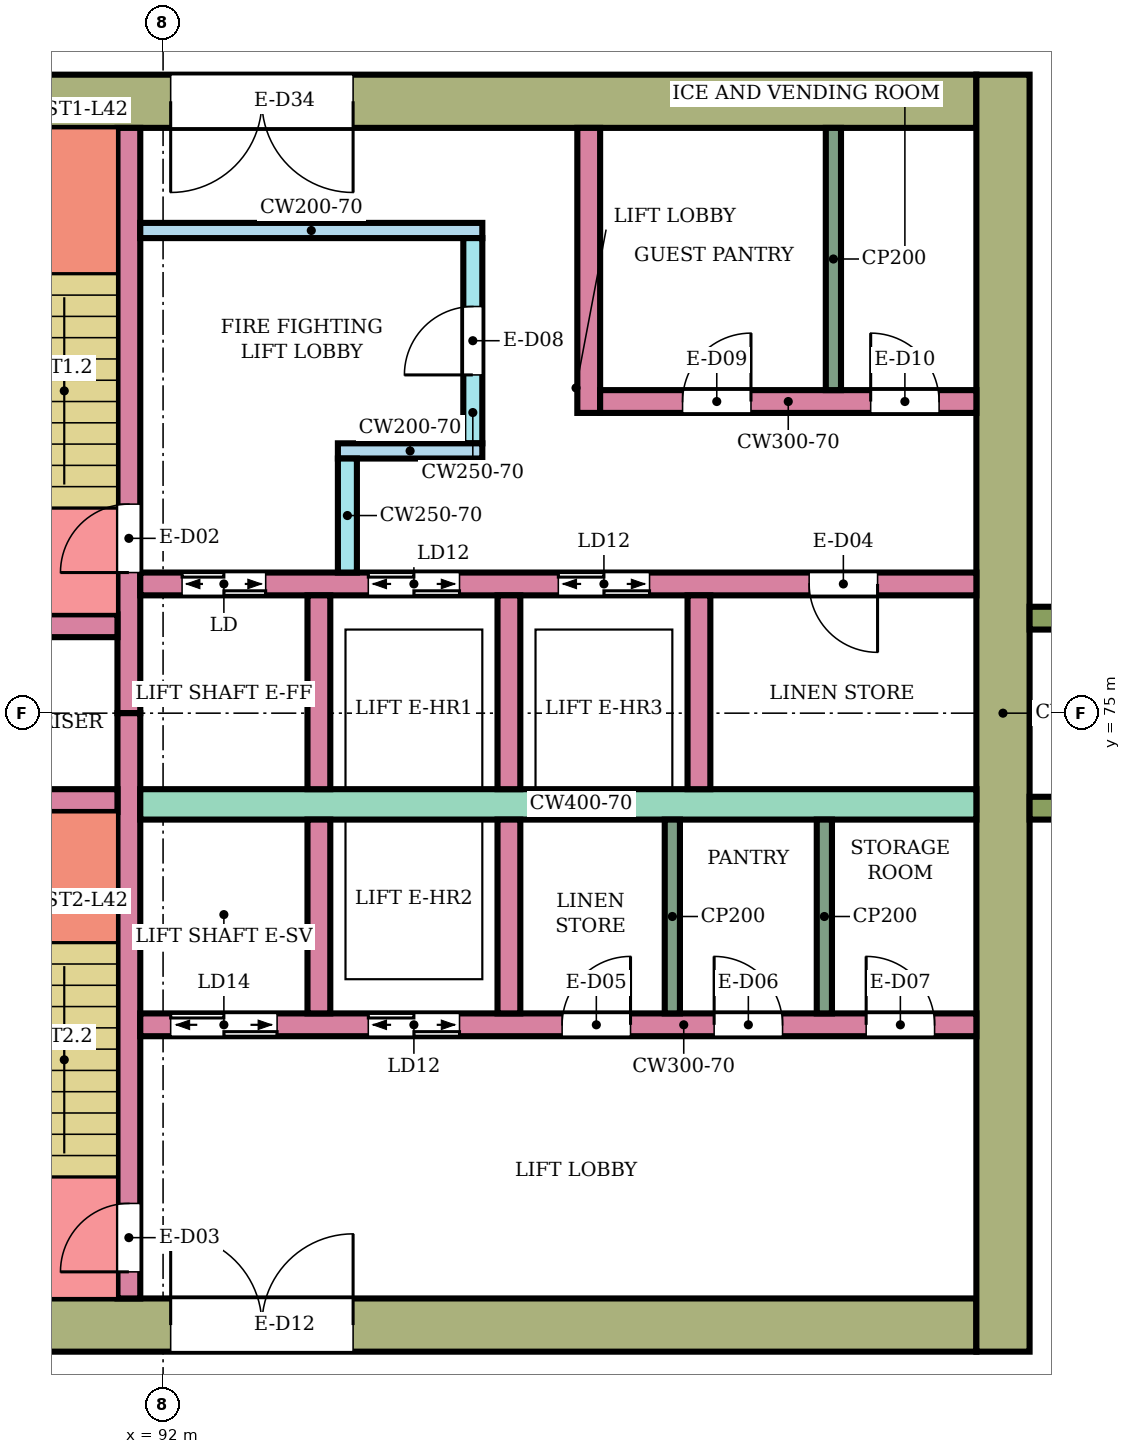
"""IFC4 building model, lengths in metres.
Left out: names, types, materials, properties, quantities, classifications, styles, units other than length and angle.
Written with IfcOpenShell. Run it as: python <this file> out.ifc"""

import sys

from ifc_helpers import new_model, si_unit, direction, frame, frame_2d, origin, place, context, subcontext, project, spatial, rectangle, extrude, element, fill, save


model = new_model("IFC4")
c1 = context("Model", 3, precision=1e-05, world=origin(), true_north=direction((0.0, 1.0)))
c2 = subcontext(c1, "Body", "Model", "MODEL_VIEW")
j1 = project(units=[si_unit("LENGTHUNIT", "METRE"), si_unit("PLANEANGLEUNIT", "RADIAN")], contexts=[c1])
p1 = place(None, origin())
s1 = spatial("IfcSite", under=j1, at=p1, CompositionType="ELEMENT")
p2 = place(p1, origin())
s2 = spatial("IfcBuilding", under=s1, at=p2, CompositionType="ELEMENT")
p3 = place(p2, frame((0.0, 0.0, 182.3)))
s3 = spatial("IfcBuildingStorey", under=s2, at=p3, CompositionType="ELEMENT", Elevation=182.3)
p4 = place(p3, frame((87.9, 83.05, 0.0), z_axis=(0.0, 0.0, 1.0), x_axis=(1.0, 0.0, 0.0)))
e1 = element("IfcWall", 1, at=p4, inside=s3, PredefinedType="SHEAR", context=c2, shape_type="SweptSolid", body=[
    extrude(rectangle(XDim=14.8, YDim=0.7, at=frame_2d((7.4, 0.0))), origin(), (0.0, 0.0, 1.0), 3.78),
])
p5 = place(p4, frame((4.2, 0.0, 0.0)))
e2 = element("IfcOpeningElement", 2, at=p5, cuts=e1, PredefinedType="OPENING", context=c2, shape_type="SweptSolid", body=[
    extrude(rectangle(XDim=2.4, YDim=2.4, at=frame_2d((1.2, 1.2))), frame((0.0, 0.36, 0.0), z_axis=(0.0, -1.0, 0.0), x_axis=(1.0, 0.0, 0.0)), (0.0, 0.0, 1.0), 0.72),
])
p6 = place(p3, frame((87.9, 66.95, 0.0), z_axis=(0.0, 0.0, 1.0), x_axis=(1.0, 0.0, 0.0)))
e3 = element("IfcWall", 3, at=p6, inside=s3, PredefinedType="SHEAR", context=c2, shape_type="SweptSolid", body=[
    extrude(rectangle(XDim=14.8, YDim=0.7, at=frame_2d((7.4, 0.0))), origin(), (0.0, 0.0, 1.0), 3.78),
])
p7 = place(p6, frame((4.2, 0.0, 0.0)))
e4 = element("IfcOpeningElement", 4, at=p7, cuts=e3, PredefinedType="OPENING", context=c2, shape_type="SweptSolid", body=[
    extrude(rectangle(XDim=2.4, YDim=2.4, at=frame_2d((1.2, 1.2))), frame((0.0, 0.36, 0.0), z_axis=(0.0, -1.0, 0.0), x_axis=(1.0, 0.0, 0.0)), (0.0, 0.0, 1.0), 0.72),
])
p8 = place(p3, frame((103.05, 66.6, 0.0), z_axis=(0.0, 0.0, 1.0), x_axis=(0.0, 1.0, 0.0)))
e5 = element("IfcWall", 5, at=p8, inside=s3, PredefinedType="SHEAR", context=c2, shape_type="SweptSolid", body=[
    extrude(rectangle(XDim=16.8, YDim=0.7, at=frame_2d((8.4, 0.0))), origin(), (0.0, 0.0, 1.0), 3.78),
])
p9 = place(p3, frame((91.55, 75.0, 0.0), z_axis=(0.0, 0.0, 1.0), x_axis=(0.0, 1.0, 0.0)))
e6 = element("IfcWall", 6, at=p9, inside=s3, PredefinedType="SHEAR", context=c2, shape_type="SweptSolid", body=[
    extrude(rectangle(XDim=7.7, YDim=0.3, at=frame_2d((3.85, 0.0))), origin(), (0.0, 0.0, 1.0), 3.78),
])
p10 = place(p9, frame((1.85, 0.0, 0.0)))
e7 = element("IfcOpeningElement", 7, at=p10, cuts=e6, PredefinedType="OPENING", context=c2, shape_type="SweptSolid", body=[
    extrude(rectangle(XDim=0.9, YDim=2.1, at=frame_2d((0.45, 1.05))), frame((0.0, 0.16, 0.0), z_axis=(0.0, -1.0, 0.0), x_axis=(1.0, 0.0, 0.0)), (0.0, 0.0, 1.0), 0.32),
])
p11 = place(p3, frame((91.55, 67.3, 0.0), z_axis=(0.0, 0.0, 1.0), x_axis=(0.0, 1.0, 0.0)))
e8 = element("IfcWall", 8, at=p11, inside=s3, PredefinedType="SHEAR", context=c2, shape_type="SweptSolid", body=[
    extrude(rectangle(XDim=7.7, YDim=0.3, at=frame_2d((3.85, 0.0))), origin(), (0.0, 0.0, 1.0), 3.78),
])
p12 = place(p11, frame((0.35, 0.0, 0.0)))
e9 = element("IfcOpeningElement", 9, at=p12, cuts=e8, PredefinedType="OPENING", context=c2, shape_type="SweptSolid", body=[
    extrude(rectangle(XDim=0.9, YDim=2.1, at=frame_2d((0.45, 1.05))), frame((0.0, 0.16, 0.0), z_axis=(0.0, -1.0, 0.0), x_axis=(1.0, 0.0, 0.0)), (0.0, 0.0, 1.0), 0.32),
])
p13 = place(p3, frame((88.35, 76.15, 0.0), z_axis=(0.0, 0.0, 1.0), x_axis=(1.0, 0.0, 0.0)))
e10 = element("IfcWall", 10, at=p13, inside=s3, PredefinedType="SHEAR", context=c2, shape_type="SweptSolid", body=[
    extrude(rectangle(XDim=3.05, YDim=0.3, at=frame_2d((1.525, 0.0))), origin(), (0.0, 0.0, 1.0), 3.78),
])
p14 = place(p13, frame((1.1, 0.0, 0.0)))
e11 = element("IfcOpeningElement", 11, at=p14, cuts=e10, PredefinedType="OPENING", context=c2, shape_type="SweptSolid", body=[
    extrude(rectangle(XDim=0.7, YDim=2.0, at=frame_2d((0.35, 1.0))), frame((0.0, 0.16, 0.0), z_axis=(0.0, -1.0, 0.0), x_axis=(1.0, 0.0, 0.0)), (0.0, 0.0, 1.0), 0.32),
])
p15 = place(p3, frame((88.35, 73.85, 0.0), z_axis=(0.0, 0.0, 1.0), x_axis=(1.0, 0.0, 0.0)))
e12 = element("IfcWall", 12, at=p15, inside=s3, PredefinedType="SHEAR", context=c2, shape_type="SweptSolid", body=[
    extrude(rectangle(XDim=3.05, YDim=0.3, at=frame_2d((1.525, 0.0))), origin(), (0.0, 0.0, 1.0), 3.78),
])
p16 = place(p3, frame((91.7, 76.7, 0.0), z_axis=(0.0, 0.0, 1.0), x_axis=(1.0, 0.0, 0.0)))
e13 = element("IfcWall", 13, at=p16, inside=s3, PredefinedType="SHEAR", context=c2, shape_type="SweptSolid", body=[
    extrude(rectangle(XDim=11.0, YDim=0.3, at=frame_2d((5.5, 0.0))), origin(), (0.0, 0.0, 1.0), 3.78),
])
p17 = place(p16, frame((0.55, 0.0, 0.0)))
e14 = element("IfcOpeningElement", 14, at=p17, cuts=e13, PredefinedType="OPENING", context=c2, shape_type="SweptSolid", body=[
    extrude(rectangle(XDim=1.1, YDim=2.1, at=frame_2d((0.55, 1.05))), frame((0.0, 0.16, 0.0), z_axis=(0.0, -1.0, 0.0), x_axis=(1.0, 0.0, 0.0)), (0.0, 0.0, 1.0), 0.32),
])
p18 = place(p16, frame((3.0, 0.0, 0.0)))
e15 = element("IfcOpeningElement", 15, at=p18, cuts=e13, PredefinedType="OPENING", context=c2, shape_type="SweptSolid", body=[
    extrude(rectangle(XDim=1.2, YDim=2.1, at=frame_2d((0.6, 1.05))), frame((0.0, 0.16, 0.0), z_axis=(0.0, -1.0, 0.0), x_axis=(1.0, 0.0, 0.0)), (0.0, 0.0, 1.0), 0.32),
])
p19 = place(p16, frame((5.5, 0.0, 0.0)))
e16 = element("IfcOpeningElement", 16, at=p19, cuts=e13, PredefinedType="OPENING", context=c2, shape_type="SweptSolid", body=[
    extrude(rectangle(XDim=1.2, YDim=2.1, at=frame_2d((0.6, 1.05))), frame((0.0, 0.16, 0.0), z_axis=(0.0, -1.0, 0.0), x_axis=(1.0, 0.0, 0.0)), (0.0, 0.0, 1.0), 0.32),
])
p20 = place(p16, frame((8.8, 0.0, 0.0)))
e17 = element("IfcOpeningElement", 17, at=p20, cuts=e13, PredefinedType="OPENING", context=c2, shape_type="SweptSolid", body=[
    extrude(rectangle(XDim=0.9, YDim=2.1, at=frame_2d((0.45, 1.05))), frame((0.0, 0.16, 0.0), z_axis=(0.0, -1.0, 0.0), x_axis=(1.0, 0.0, 0.0)), (0.0, 0.0, 1.0), 0.32),
])
p21 = place(p3, frame((91.7, 73.8, 0.0), z_axis=(0.0, 0.0, 1.0), x_axis=(1.0, 0.0, 0.0)))
e18 = element("IfcWall", 18, at=p21, inside=s3, PredefinedType="SHEAR", context=c2, shape_type="SweptSolid", body=[
    extrude(rectangle(XDim=11.0, YDim=0.4, at=frame_2d((5.5, 0.0))), origin(), (0.0, 0.0, 1.0), 3.78),
])
p22 = place(p3, frame((91.7, 70.9, 0.0), z_axis=(0.0, 0.0, 1.0), x_axis=(1.0, 0.0, 0.0)))
e19 = element("IfcWall", 19, at=p22, inside=s3, PredefinedType="SHEAR", context=c2, shape_type="SweptSolid", body=[
    extrude(rectangle(XDim=11.0, YDim=0.3, at=frame_2d((5.5, 0.0))), origin(), (0.0, 0.0, 1.0), 3.78),
])
p23 = place(p22, frame((0.4, 0.0, 0.0)))
e20 = element("IfcOpeningElement", 20, at=p23, cuts=e19, PredefinedType="OPENING", context=c2, shape_type="SweptSolid", body=[
    extrude(rectangle(XDim=1.4, YDim=2.1, at=frame_2d((0.7, 1.05))), frame((0.0, 0.16, 0.0), z_axis=(0.0, -1.0, 0.0), x_axis=(1.0, 0.0, 0.0)), (0.0, 0.0, 1.0), 0.32),
])
p24 = place(p22, frame((3.0, 0.0, 0.0)))
e21 = element("IfcOpeningElement", 21, at=p24, cuts=e19, PredefinedType="OPENING", context=c2, shape_type="SweptSolid", body=[
    extrude(rectangle(XDim=1.2, YDim=2.1, at=frame_2d((0.6, 1.05))), frame((0.0, 0.16, 0.0), z_axis=(0.0, -1.0, 0.0), x_axis=(1.0, 0.0, 0.0)), (0.0, 0.0, 1.0), 0.32),
])
p25 = place(p22, frame((5.55, 0.0, 0.0)))
e22 = element("IfcOpeningElement", 22, at=p25, cuts=e19, PredefinedType="OPENING", context=c2, shape_type="SweptSolid", body=[
    extrude(rectangle(XDim=0.9, YDim=2.1, at=frame_2d((0.45, 1.05))), frame((0.0, 0.16, 0.0), z_axis=(0.0, -1.0, 0.0), x_axis=(1.0, 0.0, 0.0)), (0.0, 0.0, 1.0), 0.32),
])
p26 = place(p22, frame((7.55, 0.0, 0.0)))
e23 = element("IfcOpeningElement", 23, at=p26, cuts=e19, PredefinedType="OPENING", context=c2, shape_type="SweptSolid", body=[
    extrude(rectangle(XDim=0.9, YDim=2.1, at=frame_2d((0.45, 1.05))), frame((0.0, 0.16, 0.0), z_axis=(0.0, -1.0, 0.0), x_axis=(1.0, 0.0, 0.0)), (0.0, 0.0, 1.0), 0.32),
])
p27 = place(p22, frame((9.55, 0.0, 0.0)))
e24 = element("IfcOpeningElement", 24, at=p27, cuts=e19, PredefinedType="OPENING", context=c2, shape_type="SweptSolid", body=[
    extrude(rectangle(XDim=0.9, YDim=2.1, at=frame_2d((0.45, 1.05))), frame((0.0, 0.16, 0.0), z_axis=(0.0, -1.0, 0.0), x_axis=(1.0, 0.0, 0.0)), (0.0, 0.0, 1.0), 0.32),
])
for number, where, z_axis, x_axis in (
    (25, (94.05, 74.0, 0.0), (0.0, 0.0, 1.0), (0.0, 1.0, 0.0)),
    (26, (96.55, 74.0, 0.0), (0.0, 0.0, 1.0), (0.0, 1.0, 0.0)),
    (27, (99.05, 74.0, 0.0), (0.0, 0.0, 1.0), (0.0, 1.0, 0.0)),
    (28, (94.05, 71.05, 0.0), (0.0, 0.0, 1.0), (0.0, 1.0, 0.0)),
    (29, (96.55, 71.05, 0.0), (0.0, 0.0, 1.0), (0.0, 1.0, 0.0)),
):
    element("IfcWall", number, at=place(p3, frame(where, z_axis=z_axis, x_axis=x_axis)), inside=s3, PredefinedType="SHEAR", context=c2, shape_type="SweptSolid", body=[
        extrude(rectangle(XDim=2.55, YDim=0.3, at=frame_2d((1.275, 0.0))), origin(), (0.0, 0.0, 1.0), 3.78),
    ])
p28 = place(p3, frame((91.7, 81.35, 0.0), z_axis=(0.0, 0.0, 1.0), x_axis=(1.0, 0.0, 0.0)))
e30 = element("IfcWall", 30, at=p28, inside=s3, PredefinedType="SHEAR", context=c2, shape_type="SweptSolid", body=[
    extrude(rectangle(XDim=4.5, YDim=0.2, at=frame_2d((2.25, 0.0))), origin(), (0.0, 0.0, 1.0), 3.78),
])
p29 = place(p3, frame((96.075, 78.55, 0.0), z_axis=(0.0, 0.0, 1.0), x_axis=(0.0, 1.0, 0.0)))
e31 = element("IfcWall", 31, at=p29, inside=s3, PredefinedType="SHEAR", context=c2, shape_type="SweptSolid", body=[
    extrude(rectangle(XDim=2.7, YDim=0.25, at=frame_2d((1.35, 0.0))), origin(), (0.0, 0.0, 1.0), 3.78),
])
p30 = place(p29, frame((0.9, 0.0, 0.0)))
e32 = element("IfcOpeningElement", 32, at=p30, cuts=e31, PredefinedType="OPENING", context=c2, shape_type="SweptSolid", body=[
    extrude(rectangle(XDim=0.9, YDim=2.1, at=frame_2d((0.45, 1.05))), frame((0.0, 0.135, 0.0), z_axis=(0.0, -1.0, 0.0), x_axis=(1.0, 0.0, 0.0)), (0.0, 0.0, 1.0), 0.27),
])
p31 = place(p3, frame((94.3, 78.45, 0.0), z_axis=(0.0, 0.0, 1.0), x_axis=(1.0, 0.0, 0.0)))
e33 = element("IfcWall", 33, at=p31, inside=s3, PredefinedType="SHEAR", context=c2, shape_type="SweptSolid", body=[
    extrude(rectangle(XDim=1.9, YDim=0.2, at=frame_2d((0.95, 0.0))), origin(), (0.0, 0.0, 1.0), 3.78),
])
p32 = place(p3, frame((94.425, 76.85, 0.0), z_axis=(0.0, 0.0, 1.0), x_axis=(0.0, 1.0, 0.0)))
e34 = element("IfcWall", 34, at=p32, inside=s3, PredefinedType="SHEAR", context=c2, shape_type="SweptSolid", body=[
    extrude(rectangle(XDim=1.5, YDim=0.25, at=frame_2d((0.75, 0.0))), origin(), (0.0, 0.0, 1.0), 3.78),
])
p33 = place(p3, frame((97.6, 78.95, 0.0), z_axis=(0.0, 0.0, 1.0), x_axis=(0.0, 1.0, 0.0)))
e35 = element("IfcWall", 35, at=p33, inside=s3, PredefinedType="SHEAR", context=c2, shape_type="SweptSolid", body=[
    extrude(rectangle(XDim=3.75, YDim=0.3, at=frame_2d((1.875, 0.0))), origin(), (0.0, 0.0, 1.0), 3.78),
])
p34 = place(p3, frame((97.75, 79.1, 0.0), z_axis=(0.0, 0.0, 1.0), x_axis=(1.0, 0.0, 0.0)))
e36 = element("IfcWall", 36, at=p34, inside=s3, PredefinedType="SHEAR", context=c2, shape_type="SweptSolid", body=[
    extrude(rectangle(XDim=4.95, YDim=0.3, at=frame_2d((2.475, 0.0))), origin(), (0.0, 0.0, 1.0), 3.78),
])
p35 = place(p34, frame((1.084, 0.0, 0.0)))
e37 = element("IfcOpeningElement", 37, at=p35, cuts=e36, PredefinedType="OPENING", context=c2, shape_type="SweptSolid", body=[
    extrude(rectangle(XDim=0.9, YDim=2.1, at=frame_2d((0.45, 1.05))), frame((0.0, 0.16, 0.0), z_axis=(0.0, -1.0, 0.0), x_axis=(1.0, 0.0, 0.0)), (0.0, 0.0, 1.0), 0.32),
])
p36 = place(p34, frame((3.56, 0.0, 0.0)))
e38 = element("IfcOpeningElement", 38, at=p36, cuts=e36, PredefinedType="OPENING", context=c2, shape_type="SweptSolid", body=[
    extrude(rectangle(XDim=0.9, YDim=2.1, at=frame_2d((0.45, 1.05))), frame((0.0, 0.16, 0.0), z_axis=(0.0, -1.0, 0.0), x_axis=(1.0, 0.0, 0.0)), (0.0, 0.0, 1.0), 0.32),
])
for number, where, z_axis, x_axis in (
    (39, (103.4, 73.75, 0.0), (0.0, 0.0, 1.0), (1.0, 0.0, 0.0)),
    (40, (103.4, 76.25, 0.0), (0.0, 0.0, 1.0), (1.0, 0.0, 0.0)),
):
    element("IfcWall", number, at=place(p3, frame(where, z_axis=z_axis, x_axis=x_axis)), inside=s3, PredefinedType="NOTDEFINED", context=c2, shape_type="SweptSolid", body=[
        extrude(rectangle(XDim=2.416, YDim=0.3, at=frame_2d((1.208, 0.0))), origin(), (0.0, 0.0, 1.0), 4.1),
    ])
for number, where, z_axis, x_axis in (
    (41, (98.7, 71.05, 0.0), (0.0, 0.0, 1.0), (0.0, 1.0, 0.0)),
    (42, (100.7, 71.05, 0.0), (0.0, 0.0, 1.0), (0.0, 1.0, 0.0)),
):
    element("IfcWall", number, at=place(p3, frame(where, z_axis=z_axis, x_axis=x_axis)), inside=s3, PredefinedType="PARTITIONING", context=c2, shape_type="SweptSolid", body=[
        extrude(rectangle(XDim=2.55, YDim=0.2, at=frame_2d((1.275, 0.0))), origin(), (0.0, 0.0, 1.0), 3.78),
    ])
p37 = place(p3, frame((100.819, 79.25, 0.0), z_axis=(0.0, 0.0, 1.0), x_axis=(0.0, 1.0, 0.0)))
e43 = element("IfcWall", 43, at=p37, inside=s3, PredefinedType="PARTITIONING", context=c2, shape_type="SweptSolid", body=[
    extrude(rectangle(XDim=3.45, YDim=0.2, at=frame_2d((1.725, 0.0))), origin(), (0.0, 0.0, 1.0), 3.78),
])
p38 = place(p10, origin())
e44 = element("IfcDoor", 44, at=p38, inside=s3, OperationType="SINGLE_SWING_LEFT", PredefinedType="DOOR", context=c2, shape_type="SweptSolid", body=[
    extrude(rectangle(XDim=0.9, YDim=2.1, at=frame_2d((0.45, 1.05))), frame((0.0, 0.025, 0.0), z_axis=(0.0, -1.0, 0.0), x_axis=(1.0, 0.0, 0.0)), (0.0, 0.0, 1.0), 0.05),
])
fill(e7, e44)
p39 = place(p12, origin())
e45 = element("IfcDoor", 45, at=p39, inside=s3, OperationType="SINGLE_SWING_LEFT", PredefinedType="DOOR", context=c2, shape_type="SweptSolid", body=[
    extrude(rectangle(XDim=0.9, YDim=2.1, at=frame_2d((0.45, 1.05))), frame((0.0, 0.025, 0.0), z_axis=(0.0, -1.0, 0.0), x_axis=(1.0, 0.0, 0.0)), (0.0, 0.0, 1.0), 0.05),
])
fill(e9, e45)
p40 = place(p17, origin())
e46 = element("IfcDoor", 46, at=p40, inside=s3, OperationType="DOUBLE_DOOR_SLIDING", PredefinedType="DOOR", context=c2, shape_type="SweptSolid", body=[
    extrude(rectangle(XDim=1.1, YDim=2.1, at=frame_2d((0.55, 1.05))), frame((0.0, 0.025, 0.0), z_axis=(0.0, -1.0, 0.0), x_axis=(1.0, 0.0, 0.0)), (0.0, 0.0, 1.0), 0.05),
])
fill(e14, e46)
p41 = place(p18, origin())
e47 = element("IfcDoor", 47, at=p41, inside=s3, OperationType="DOUBLE_DOOR_SLIDING", PredefinedType="DOOR", context=c2, shape_type="SweptSolid", body=[
    extrude(rectangle(XDim=1.2, YDim=2.1, at=frame_2d((0.6, 1.05))), frame((0.0, 0.025, 0.0), z_axis=(0.0, -1.0, 0.0), x_axis=(1.0, 0.0, 0.0)), (0.0, 0.0, 1.0), 0.05),
])
fill(e15, e47)
p42 = place(p19, origin())
e48 = element("IfcDoor", 48, at=p42, inside=s3, OperationType="DOUBLE_DOOR_SLIDING", PredefinedType="DOOR", context=c2, shape_type="SweptSolid", body=[
    extrude(rectangle(XDim=1.2, YDim=2.1, at=frame_2d((0.6, 1.05))), frame((0.0, 0.025, 0.0), z_axis=(0.0, -1.0, 0.0), x_axis=(1.0, 0.0, 0.0)), (0.0, 0.0, 1.0), 0.05),
])
fill(e16, e48)
p43 = place(p20, frame((0.9, 0.0, 0.0), z_axis=(0.0, 0.0, 1.0), x_axis=(-1.0, 0.0, 0.0)))
e49 = element("IfcDoor", 49, at=p43, inside=s3, OperationType="SINGLE_SWING_LEFT", PredefinedType="DOOR", context=c2, shape_type="SweptSolid", body=[
    extrude(rectangle(XDim=0.9, YDim=2.1, at=frame_2d((0.45, 1.05))), frame((0.0, 0.025, 0.0), z_axis=(0.0, -1.0, 0.0), x_axis=(1.0, 0.0, 0.0)), (0.0, 0.0, 1.0), 0.05),
])
fill(e17, e49)
p44 = place(p23, origin())
e50 = element("IfcDoor", 50, at=p44, inside=s3, OperationType="DOUBLE_DOOR_SLIDING", PredefinedType="DOOR", context=c2, shape_type="SweptSolid", body=[
    extrude(rectangle(XDim=1.4, YDim=2.1, at=frame_2d((0.7, 1.05))), frame((0.0, 0.025, 0.0), z_axis=(0.0, -1.0, 0.0), x_axis=(1.0, 0.0, 0.0)), (0.0, 0.0, 1.0), 0.05),
])
fill(e20, e50)
p45 = place(p24, origin())
e51 = element("IfcDoor", 51, at=p45, inside=s3, OperationType="DOUBLE_DOOR_SLIDING", PredefinedType="DOOR", context=c2, shape_type="SweptSolid", body=[
    extrude(rectangle(XDim=1.2, YDim=2.1, at=frame_2d((0.6, 1.05))), frame((0.0, 0.025, 0.0), z_axis=(0.0, -1.0, 0.0), x_axis=(1.0, 0.0, 0.0)), (0.0, 0.0, 1.0), 0.05),
])
fill(e21, e51)
p46 = place(p25, origin())
e52 = element("IfcDoor", 52, at=p46, inside=s3, OperationType="SINGLE_SWING_RIGHT", PredefinedType="DOOR", context=c2, shape_type="SweptSolid", body=[
    extrude(rectangle(XDim=0.9, YDim=2.1, at=frame_2d((0.45, 1.05))), frame((0.0, 0.025, 0.0), z_axis=(0.0, -1.0, 0.0), x_axis=(1.0, 0.0, 0.0)), (0.0, 0.0, 1.0), 0.05),
])
fill(e22, e52)
p47 = place(p26, origin())
e53 = element("IfcDoor", 53, at=p47, inside=s3, OperationType="SINGLE_SWING_LEFT", PredefinedType="DOOR", context=c2, shape_type="SweptSolid", body=[
    extrude(rectangle(XDim=0.9, YDim=2.1, at=frame_2d((0.45, 1.05))), frame((0.0, 0.025, 0.0), z_axis=(0.0, -1.0, 0.0), x_axis=(1.0, 0.0, 0.0)), (0.0, 0.0, 1.0), 0.05),
])
fill(e23, e53)
p48 = place(p27, origin())
e54 = element("IfcDoor", 54, at=p48, inside=s3, OperationType="SINGLE_SWING_LEFT", PredefinedType="DOOR", context=c2, shape_type="SweptSolid", body=[
    extrude(rectangle(XDim=0.9, YDim=2.1, at=frame_2d((0.45, 1.05))), frame((0.0, 0.025, 0.0), z_axis=(0.0, -1.0, 0.0), x_axis=(1.0, 0.0, 0.0)), (0.0, 0.0, 1.0), 0.05),
])
fill(e24, e54)
p49 = place(p30, origin())
e55 = element("IfcDoor", 55, at=p49, inside=s3, OperationType="SINGLE_SWING_LEFT", PredefinedType="DOOR", context=c2, shape_type="SweptSolid", body=[
    extrude(rectangle(XDim=0.9, YDim=2.1, at=frame_2d((0.45, 1.05))), frame((0.0, 0.025, 0.0), z_axis=(0.0, -1.0, 0.0), x_axis=(1.0, 0.0, 0.0)), (0.0, 0.0, 1.0), 0.05),
])
fill(e32, e55)
p50 = place(p35, origin())
e56 = element("IfcDoor", 56, at=p50, inside=s3, OperationType="SINGLE_SWING_RIGHT", PredefinedType="DOOR", context=c2, shape_type="SweptSolid", body=[
    extrude(rectangle(XDim=0.9, YDim=2.1, at=frame_2d((0.45, 1.05))), frame((0.0, 0.025, 0.0), z_axis=(0.0, -1.0, 0.0), x_axis=(1.0, 0.0, 0.0)), (0.0, 0.0, 1.0), 0.05),
])
fill(e37, e56)
p51 = place(p36, origin())
e57 = element("IfcDoor", 57, at=p51, inside=s3, OperationType="SINGLE_SWING_LEFT", PredefinedType="DOOR", context=c2, shape_type="SweptSolid", body=[
    extrude(rectangle(XDim=0.9, YDim=2.1, at=frame_2d((0.45, 1.05))), frame((0.0, 0.025, 0.0), z_axis=(0.0, -1.0, 0.0), x_axis=(1.0, 0.0, 0.0)), (0.0, 0.0, 1.0), 0.05),
])
fill(e38, e57)
p52 = place(p5, frame((2.4, 0.0, 0.0), z_axis=(0.0, 0.0, 1.0), x_axis=(-1.0, 0.0, 0.0)))
e58 = element("IfcDoor", 58, at=p52, inside=s3, OperationType="DOUBLE_DOOR_SINGLE_SWING", PredefinedType="DOOR", context=c2, shape_type="SweptSolid", body=[
    extrude(rectangle(XDim=2.4, YDim=2.4, at=frame_2d((1.2, 1.2))), frame((0.0, 0.025, 0.0), z_axis=(0.0, -1.0, 0.0), x_axis=(1.0, 0.0, 0.0)), (0.0, 0.0, 1.0), 0.05),
])
fill(e2, e58)
p53 = place(p7, origin())
e59 = element("IfcDoor", 59, at=p53, inside=s3, OperationType="DOUBLE_DOOR_SINGLE_SWING", PredefinedType="DOOR", context=c2, shape_type="SweptSolid", body=[
    extrude(rectangle(XDim=2.4, YDim=2.4, at=frame_2d((1.2, 1.2))), frame((0.0, 0.025, 0.0), z_axis=(0.0, -1.0, 0.0), x_axis=(1.0, 0.0, 0.0)), (0.0, 0.0, 1.0), 0.05),
])
fill(e4, e59)
save(model, sys.argv[1])
